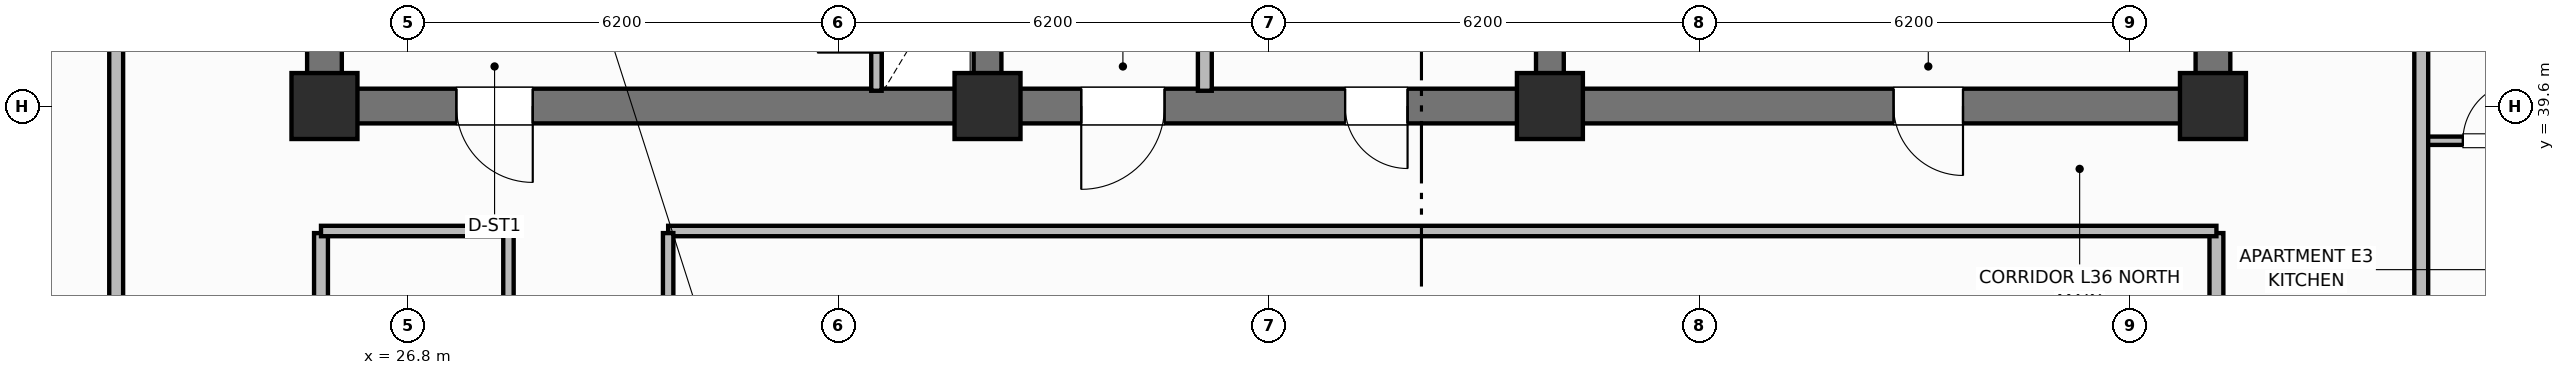
"""IFC4 building model, lengths in metres.
Left out: names, types, materials, properties, quantities, classifications, styles, units other than length and angle.
Written with IfcOpenShell. Run it as: python <this file> out.ifc"""

import sys

from ifc_helpers import new_model, si_unit, direction, frame, frame_2d, origin, origin_2d, place, context, subcontext, project, spatial, rectangle, extrude, element, fill, save


model = new_model("IFC4")
c1 = context("Model", 3, precision=1e-05, world=origin(), true_north=direction((0.0, 1.0)))
c2 = subcontext(c1, "Body", "Model", "MODEL_VIEW")
j1 = project(units=[si_unit("LENGTHUNIT", "METRE"), si_unit("PLANEANGLEUNIT", "RADIAN")], contexts=[c1])
p1 = place(None, origin())
s1 = spatial("IfcSite", under=j1, at=p1, CompositionType="ELEMENT")
p2 = place(p1, origin())
s2 = spatial("IfcBuilding", under=s1, at=p2, CompositionType="ELEMENT")
p3 = place(p2, frame((0.0, 0.0, 147.8)))
s3 = spatial("IfcBuildingStorey", under=s2, at=p3, CompositionType="ELEMENT", Elevation=147.8)
for number, where, z_axis, x_axis in (
    (1, (25.6, 39.85, 0.0), (0.0, 0.0, 1.0), (0.0, 1.0, 0.0)),
    (2, (52.8, 39.85, 0.0), (0.0, 0.0, 1.0), (0.0, 1.0, 0.0)),
):
    element("IfcWall", number, at=place(p3, frame(where, z_axis=z_axis, x_axis=x_axis)), inside=s3, PredefinedType="SHEAR", context=c2, shape_type="SweptSolid", body=[
        extrude(rectangle(XDim=5.7, YDim=0.5, at=frame_2d((2.85, 0.0))), origin(), (0.0, 0.0, 1.0), 3.7),
    ])
p4 = place(p3, frame((52.8, 39.6, 0.0), z_axis=(0.0, 0.0, 1.0), x_axis=(-1.0, 0.0, 0.0)))
e3 = element("IfcWall", 3, at=p4, inside=s3, PredefinedType="SHEAR", context=c2, shape_type="SweptSolid", body=[
    extrude(rectangle(XDim=27.2, YDim=0.5, at=frame_2d((13.6, 0.0))), origin(), (0.0, 0.0, 1.0), 3.7),
])
p5 = place(p4, frame((24.2, 0.0, 0.0)))
e4 = element("IfcOpeningElement", 4, at=p5, cuts=e3, PredefinedType="OPENING", context=c2, shape_type="SweptSolid", body=[
    extrude(rectangle(XDim=1.1, YDim=2.15, at=frame_2d((0.55, 1.075))), frame((0.0, 0.26, 0.0), z_axis=(0.0, -1.0, 0.0), x_axis=(1.0, 0.0, 0.0)), (0.0, 0.0, 1.0), 0.52),
])
p6 = place(p4, frame((15.1, 0.0, 0.0)))
e5 = element("IfcOpeningElement", 5, at=p6, cuts=e3, PredefinedType="OPENING", context=c2, shape_type="SweptSolid", body=[
    extrude(rectangle(XDim=1.2, YDim=2.15, at=frame_2d((0.6, 1.075))), frame((0.0, 0.26, 0.0), z_axis=(0.0, -1.0, 0.0), x_axis=(1.0, 0.0, 0.0)), (0.0, 0.0, 1.0), 0.52),
])
p7 = place(p4, frame((11.6, 0.0, 0.0)))
e6 = element("IfcOpeningElement", 6, at=p7, cuts=e3, PredefinedType="OPENING", context=c2, shape_type="SweptSolid", body=[
    extrude(rectangle(XDim=0.9, YDim=2.1, at=frame_2d((0.45, 1.05))), frame((0.0, 0.26, 0.0), z_axis=(0.0, -1.0, 0.0), x_axis=(1.0, 0.0, 0.0)), (0.0, 0.0, 1.0), 0.52),
])
p8 = place(p4, frame((3.6, 0.0, 0.0)))
e7 = element("IfcOpeningElement", 7, at=p8, cuts=e3, PredefinedType="OPENING", context=c2, shape_type="SweptSolid", body=[
    extrude(rectangle(XDim=1.0, YDim=2.15, at=frame_2d((0.5, 1.075))), frame((0.0, 0.26, 0.0), z_axis=(0.0, -1.0, 0.0), x_axis=(1.0, 0.0, 0.0)), (0.0, 0.0, 1.0), 0.52),
])
for number, where, z_axis, x_axis in (
    (8, (35.15, 39.85, 0.0), (0.0, 0.0, 1.0), (0.0, 1.0, 0.0)),
    (9, (43.25, 39.85, 0.0), (0.0, 0.0, 1.0), (0.0, 1.0, 0.0)),
):
    element("IfcWall", number, at=place(p3, frame(where, z_axis=z_axis, x_axis=x_axis)), inside=s3, PredefinedType="SHEAR", context=c2, shape_type="SweptSolid", body=[
        extrude(rectangle(XDim=5.7, YDim=0.4, at=frame_2d((2.85, 0.0))), origin(), (0.0, 0.0, 1.0), 3.7),
    ])
for number, where, z_axis, x_axis in (
    (10, (25.6, 39.6, 0.0), (0.0, 0.0, 1.0), (1.0, 0.0, 0.0)),
    (11, (35.15, 39.6, 0.0), (0.0, 0.0, 1.0), (1.0, 0.0, 0.0)),
    (12, (43.25, 39.6, 0.0), (0.0, 0.0, 1.0), (1.0, 0.0, 0.0)),
    (13, (52.8, 39.6, 0.0), (0.0, 0.0, 1.0), (1.0, 0.0, 0.0)),
):
    element("IfcColumn", number, at=place(p3, frame(where, z_axis=z_axis, x_axis=x_axis)), inside=s3, PredefinedType="COLUMN", context=c2, shape_type="SweptSolid", body=[
        extrude(rectangle(XDim=0.95, YDim=0.95, at=origin_2d()), origin(), (0.0, 0.0, 1.0), 3.7),
    ])
p9 = place(p3, frame((33.55, 39.82, 0.0), z_axis=(0.0, 0.0, 1.0), x_axis=(0.0, 1.0, 0.0)))
e14 = element("IfcWall", 14, at=p9, inside=s3, PredefinedType="PARTITIONING", context=c2, shape_type="SweptSolid", body=[
    extrude(rectangle(XDim=2.13, YDim=0.15, at=frame_2d((1.065, 0.0))), origin(), (0.0, 0.0, 1.0), 2.55),
])
p10 = place(p9, frame((0.55, 0.0, 0.0)))
e15 = element("IfcOpeningElement", 15, at=p10, cuts=e14, PredefinedType="OPENING", context=c2, shape_type="SweptSolid", body=[
    extrude(rectangle(XDim=0.85, YDim=2.05, at=frame_2d((0.425, 1.025))), frame((0.0, 0.085, 0.0), z_axis=(0.0, -1.0, 0.0), x_axis=(1.0, 0.0, 0.0)), (0.0, 0.0, 1.0), 0.17),
])
p11 = place(p3, frame((38.28, 39.82, 0.0), z_axis=(0.0, 0.0, 1.0), x_axis=(0.0, 1.0, 0.0)))
e16 = element("IfcWall", 16, at=p11, inside=s3, PredefinedType="PARTITIONING", context=c2, shape_type="SweptSolid", body=[
    extrude(rectangle(XDim=2.73, YDim=0.2, at=frame_2d((1.365, 0.0))), origin(), (0.0, 0.0, 1.0), 2.55),
])
for number, where, z_axis, x_axis in (
    (17, (25.55, 18.63, 0.0), (0.0, 0.0, 1.0), (0.0, 1.0, 0.0)),
    (18, (52.85, 18.63, 0.0), (0.0, 0.0, 1.0), (0.0, 1.0, 0.0)),
):
    element("IfcWall", number, at=place(p3, frame(where, z_axis=z_axis, x_axis=x_axis)), inside=s3, PredefinedType="PARTITIONING", context=c2, shape_type="SweptSolid", body=[
        extrude(rectangle(XDim=19.14, YDim=0.2, at=frame_2d((9.57, 0.0))), origin(), (0.0, 0.0, 1.0), 2.55),
    ])
p12 = place(p3, frame((25.55, 37.8, 0.0), z_axis=(0.0, 0.0, 1.0), x_axis=(1.0, 0.0, 0.0)))
e19 = element("IfcWall", 19, at=p12, inside=s3, PredefinedType="PARTITIONING", context=c2, shape_type="SweptSolid", body=[
    extrude(rectangle(XDim=2.7, YDim=0.15, at=frame_2d((1.35, 0.0))), origin(), (0.0, 0.0, 1.0), 2.55),
])
p13 = place(p3, frame((30.55, 37.8, 0.0), z_axis=(0.0, 0.0, 1.0), x_axis=(1.0, 0.0, 0.0)))
e20 = element("IfcWall", 20, at=p13, inside=s3, PredefinedType="PARTITIONING", context=c2, shape_type="SweptSolid", body=[
    extrude(rectangle(XDim=22.3, YDim=0.15, at=frame_2d((11.15, 0.0))), origin(), (0.0, 0.0, 1.0), 2.55),
])
p14 = place(p3, frame((28.25, 18.63, 0.0), z_axis=(0.0, 0.0, 1.0), x_axis=(0.0, 1.0, 0.0)))
e21 = element("IfcWall", 21, at=p14, inside=s3, PredefinedType="PARTITIONING", context=c2, shape_type="SweptSolid", body=[
    extrude(rectangle(XDim=19.14, YDim=0.15, at=frame_2d((9.57, 0.0))), origin(), (0.0, 0.0, 1.0), 2.55),
])
p15 = place(p14, frame((3.0, 0.0, 0.0)))
e22 = element("IfcOpeningElement", 22, at=p15, cuts=e21, PredefinedType="OPENING", context=c2, shape_type="SweptSolid", body=[
    extrude(rectangle(XDim=0.9, YDim=2.1, at=frame_2d((0.45, 1.05))), frame((0.0, 0.085, 0.0), z_axis=(0.0, -1.0, 0.0), x_axis=(1.0, 0.0, 0.0)), (0.0, 0.0, 1.0), 0.17),
])
p16 = place(p14, frame((11.5, 0.0, 0.0)))
e23 = element("IfcOpeningElement", 23, at=p16, cuts=e21, PredefinedType="OPENING", context=c2, shape_type="SweptSolid", body=[
    extrude(rectangle(XDim=0.9, YDim=2.1, at=frame_2d((0.45, 1.05))), frame((0.0, 0.085, 0.0), z_axis=(0.0, -1.0, 0.0), x_axis=(1.0, 0.0, 0.0)), (0.0, 0.0, 1.0), 0.17),
])
p17 = place(p3, frame((30.55, 18.63, 0.0), z_axis=(0.0, 0.0, 1.0), x_axis=(0.0, 1.0, 0.0)))
e24 = element("IfcWall", 24, at=p17, inside=s3, PredefinedType="PARTITIONING", context=c2, shape_type="SweptSolid", body=[
    extrude(rectangle(XDim=19.14, YDim=0.15, at=frame_2d((9.57, 0.0))), origin(), (0.0, 0.0, 1.0), 2.55),
])
p18 = place(p17, frame((2.4, 0.0, 0.0)))
e25 = element("IfcOpeningElement", 25, at=p18, cuts=e24, PredefinedType="OPENING", context=c2, shape_type="SweptSolid", body=[
    extrude(rectangle(XDim=1.0, YDim=2.15, at=frame_2d((0.5, 1.075))), frame((0.0, 0.085, 0.0), z_axis=(0.0, -1.0, 0.0), x_axis=(1.0, 0.0, 0.0)), (0.0, 0.0, 1.0), 0.17),
])
p19 = place(p17, frame((8.89, 0.0, 0.0)))
e26 = element("IfcOpeningElement", 26, at=p19, cuts=e24, PredefinedType="OPENING", context=c2, shape_type="SweptSolid", body=[
    extrude(rectangle(XDim=1.0, YDim=2.15, at=frame_2d((0.5, 1.075))), frame((0.0, 0.085, 0.0), z_axis=(0.0, -1.0, 0.0), x_axis=(1.0, 0.0, 0.0)), (0.0, 0.0, 1.0), 0.17),
])
p20 = place(p3, frame((22.6, 10.6, 0.0), z_axis=(0.0, 0.0, 1.0), x_axis=(0.0, 1.0, 0.0)))
e27 = element("IfcWall", 27, at=p20, inside=s3, PredefinedType="PARTITIONING", context=c2, shape_type="SweptSolid", body=[
    extrude(rectangle(XDim=35.2, YDim=0.2, at=frame_2d((17.6, 0.0))), origin(), (0.0, 0.0, 1.0), 2.55),
])
p21 = place(p20, frame((2.65, 0.0, 0.0)))
e28 = element("IfcOpeningElement", 28, at=p21, cuts=e27, PredefinedType="OPENING", context=c2, shape_type="SweptSolid", body=[
    extrude(rectangle(XDim=1.0, YDim=2.15, at=frame_2d((0.5, 1.075))), frame((0.0, 0.11, 0.0), z_axis=(0.0, -1.0, 0.0), x_axis=(1.0, 0.0, 0.0)), (0.0, 0.0, 1.0), 0.22),
])
p22 = place(p20, frame((19.95, 0.0, 0.0)))
e29 = element("IfcOpeningElement", 29, at=p22, cuts=e27, PredefinedType="OPENING", context=c2, shape_type="SweptSolid", body=[
    extrude(rectangle(XDim=1.0, YDim=2.15, at=frame_2d((0.5, 1.075))), frame((0.0, 0.11, 0.0), z_axis=(0.0, -1.0, 0.0), x_axis=(1.0, 0.0, 0.0)), (0.0, 0.0, 1.0), 0.22),
])
p23 = place(p3, frame((55.8, 39.1, 0.0), z_axis=(0.0, 0.0, 1.0), x_axis=(1.0, 0.0, 0.0)))
e30 = element("IfcWall", 30, at=p23, inside=s3, PredefinedType="PARTITIONING", context=c2, shape_type="SweptSolid", body=[
    extrude(rectangle(XDim=2.25, YDim=0.12, at=frame_2d((1.125, 0.0))), origin(), (0.0, 0.0, 1.0), 2.55),
])
p24 = place(p23, frame((0.6, 0.0, 0.0)))
e31 = element("IfcOpeningElement", 31, at=p24, cuts=e30, PredefinedType="OPENING", context=c2, shape_type="SweptSolid", body=[
    extrude(rectangle(XDim=0.85, YDim=2.1, at=frame_2d((0.425, 1.05))), frame((0.0, 0.07, 0.0), z_axis=(0.0, -1.0, 0.0), x_axis=(1.0, 0.0, 0.0)), (0.0, 0.0, 1.0), 0.14),
])
p25 = place(p3, frame((55.8, 10.6, 0.0), z_axis=(0.0, 0.0, 1.0), x_axis=(0.0, 1.0, 0.0)))
e32 = element("IfcWall", 32, at=p25, inside=s3, PredefinedType="PARTITIONING", context=c2, shape_type="SweptSolid", body=[
    extrude(rectangle(XDim=35.2, YDim=0.2, at=frame_2d((17.6, 0.0))), origin(), (0.0, 0.0, 1.0), 2.55),
])
p26 = place(p25, frame((2.65, 0.0, 0.0)))
e33 = element("IfcOpeningElement", 33, at=p26, cuts=e32, PredefinedType="OPENING", context=c2, shape_type="SweptSolid", body=[
    extrude(rectangle(XDim=1.0, YDim=2.15, at=frame_2d((0.5, 1.075))), frame((0.0, 0.11, 0.0), z_axis=(0.0, -1.0, 0.0), x_axis=(1.0, 0.0, 0.0)), (0.0, 0.0, 1.0), 0.22),
])
p27 = place(p25, frame((12.518, 0.0, 0.0)))
e34 = element("IfcOpeningElement", 34, at=p27, cuts=e32, PredefinedType="OPENING", context=c2, shape_type="SweptSolid", body=[
    extrude(rectangle(XDim=1.0, YDim=2.15, at=frame_2d((0.5, 1.075))), frame((0.0, 0.11, 0.0), z_axis=(0.0, -1.0, 0.0), x_axis=(1.0, 0.0, 0.0)), (0.0, 0.0, 1.0), 0.22),
])
p28 = place(p25, frame((23.65, 0.0, 0.0)))
e35 = element("IfcOpeningElement", 35, at=p28, cuts=e32, PredefinedType="OPENING", context=c2, shape_type="SweptSolid", body=[
    extrude(rectangle(XDim=1.0, YDim=2.15, at=frame_2d((0.5, 1.075))), frame((0.0, 0.11, 0.0), z_axis=(0.0, -1.0, 0.0), x_axis=(1.0, 0.0, 0.0)), (0.0, 0.0, 1.0), 0.22),
])
p29 = place(p10, origin())
e36 = element("IfcDoor", 36, at=p29, inside=s3, OperationType="SINGLE_SWING_LEFT", PredefinedType="TRAPDOOR", context=c2, shape_type="SweptSolid", body=[
    extrude(rectangle(XDim=0.85, YDim=2.05, at=frame_2d((0.425, 1.025))), frame((0.0, 0.025, 0.0), z_axis=(0.0, -1.0, 0.0), x_axis=(1.0, 0.0, 0.0)), (0.0, 0.0, 1.0), 0.05),
])
fill(e15, e36)
p30 = place(p24, origin())
e37 = element("IfcDoor", 37, at=p30, inside=s3, OperationType="SINGLE_SWING_RIGHT", PredefinedType="DOOR", context=c2, shape_type="SweptSolid", body=[
    extrude(rectangle(XDim=0.85, YDim=2.1, at=frame_2d((0.425, 1.05))), frame((0.0, 0.025, 0.0), z_axis=(0.0, -1.0, 0.0), x_axis=(1.0, 0.0, 0.0)), (0.0, 0.0, 1.0), 0.05),
])
fill(e31, e37)
p31 = place(p5, origin())
e38 = element("IfcDoor", 38, at=p31, inside=s3, OperationType="SINGLE_SWING_LEFT", PredefinedType="DOOR", context=c2, shape_type="SweptSolid", body=[
    extrude(rectangle(XDim=1.1, YDim=2.15, at=frame_2d((0.55, 1.075))), frame((0.0, 0.025, 0.0), z_axis=(0.0, -1.0, 0.0), x_axis=(1.0, 0.0, 0.0)), (0.0, 0.0, 1.0), 0.05),
])
fill(e4, e38)
p32 = place(p6, origin())
e39 = element("IfcDoor", 39, at=p32, inside=s3, OperationType="SINGLE_SWING_RIGHT", PredefinedType="DOOR", context=c2, shape_type="SweptSolid", body=[
    extrude(rectangle(XDim=1.2, YDim=2.15, at=frame_2d((0.6, 1.075))), frame((0.0, 0.025, 0.0), z_axis=(0.0, -1.0, 0.0), x_axis=(1.0, 0.0, 0.0)), (0.0, 0.0, 1.0), 0.05),
])
fill(e5, e39)
p33 = place(p7, origin())
e40 = element("IfcDoor", 40, at=p33, inside=s3, OperationType="SINGLE_SWING_LEFT", PredefinedType="DOOR", context=c2, shape_type="SweptSolid", body=[
    extrude(rectangle(XDim=0.9, YDim=2.1, at=frame_2d((0.45, 1.05))), frame((0.0, 0.025, 0.0), z_axis=(0.0, -1.0, 0.0), x_axis=(1.0, 0.0, 0.0)), (0.0, 0.0, 1.0), 0.05),
])
fill(e6, e40)
p34 = place(p8, origin())
e41 = element("IfcDoor", 41, at=p34, inside=s3, OperationType="SINGLE_SWING_LEFT", PredefinedType="DOOR", context=c2, shape_type="SweptSolid", body=[
    extrude(rectangle(XDim=1.0, YDim=2.15, at=frame_2d((0.5, 1.075))), frame((0.0, 0.025, 0.0), z_axis=(0.0, -1.0, 0.0), x_axis=(1.0, 0.0, 0.0)), (0.0, 0.0, 1.0), 0.05),
])
fill(e7, e41)
save(model, sys.argv[1])
